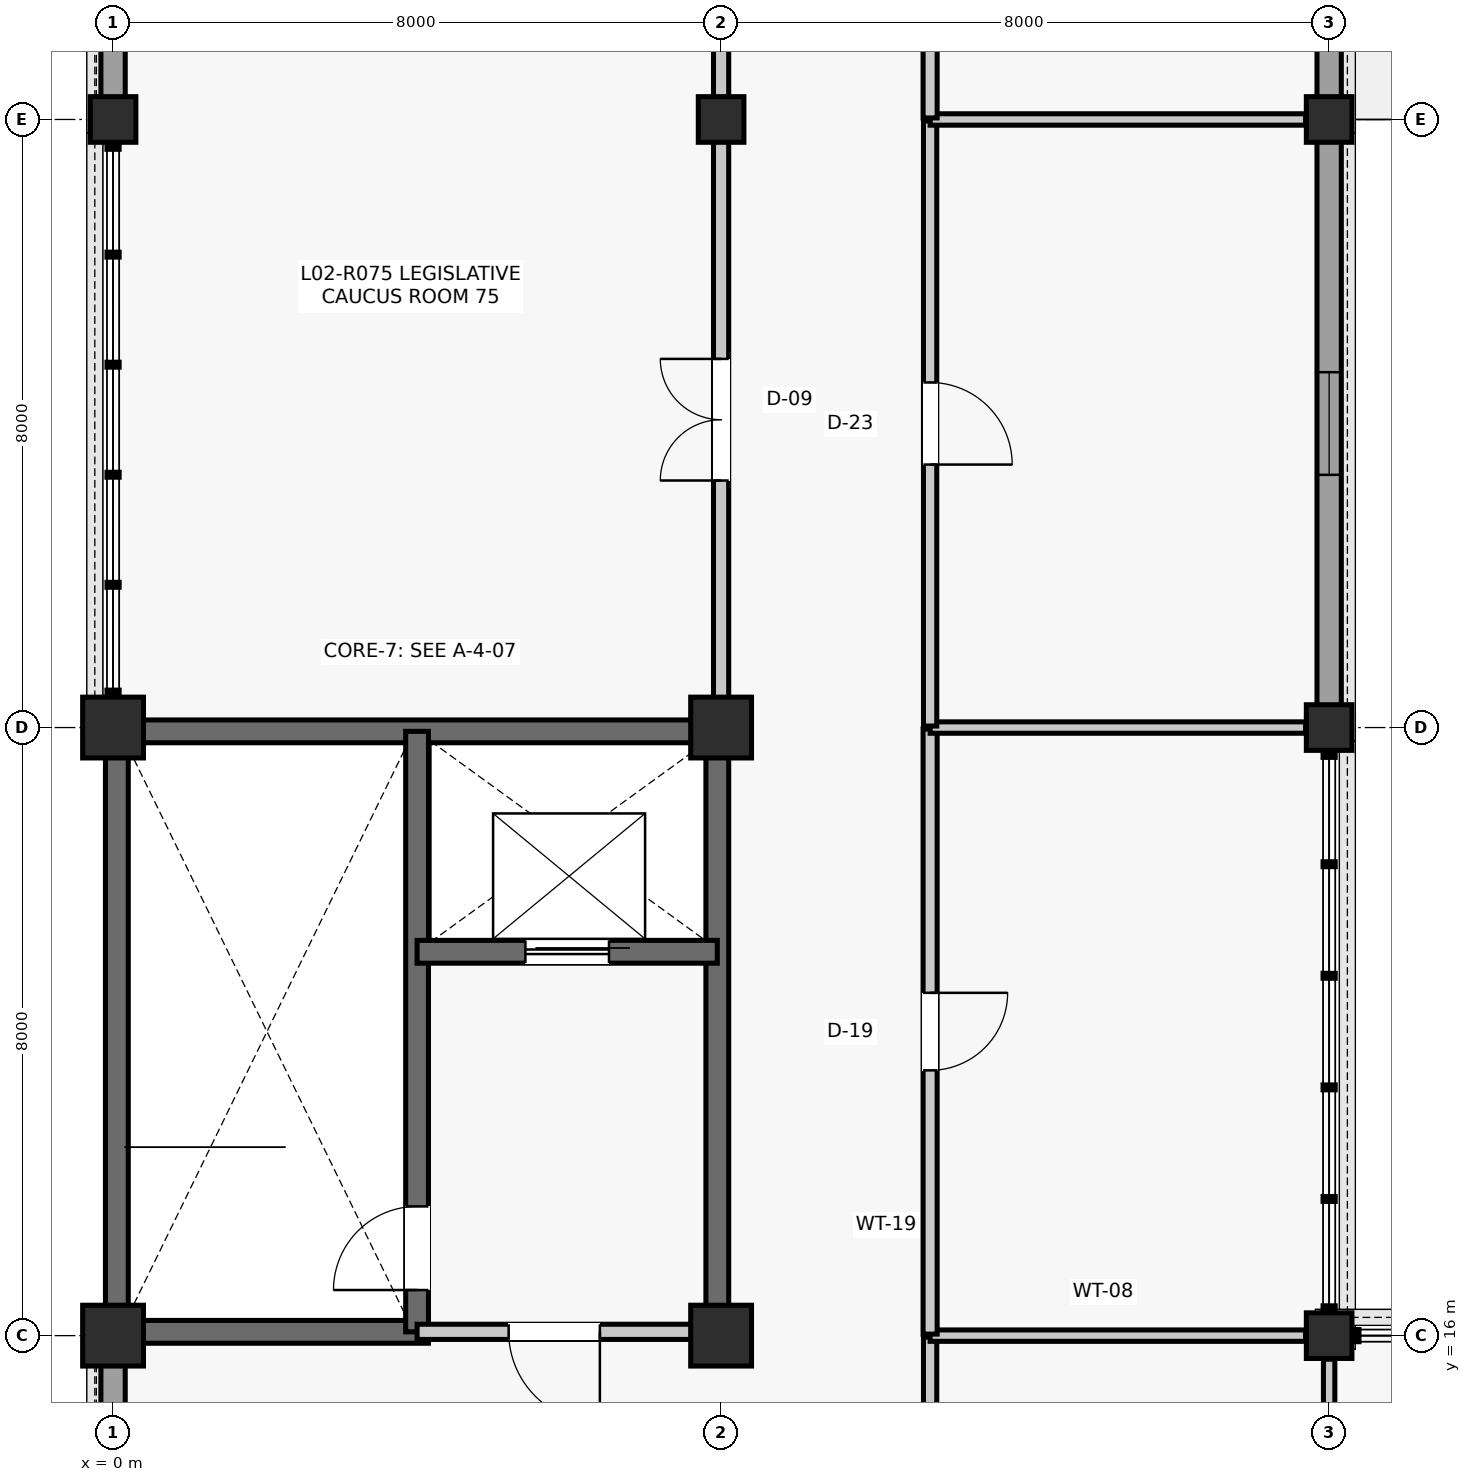
"""IFC4 building model, lengths in metres.
Left out: names, types, materials, properties, quantities, classifications, styles, units other than length and angle.
Written with IfcOpenShell. Run it as: python <this file> out.ifc"""

import sys

from ifc_helpers import new_model, si_unit, direction, frame, frame_2d, origin, origin_2d, place, context, subcontext, project, spatial, rectangle, extrude, element, fill, save


model = new_model("IFC4")
c1 = context("Model", 3, precision=1e-05, world=origin(), true_north=direction((0.0, 1.0)))
c2 = subcontext(c1, "Body", "Model", "MODEL_VIEW")
j1 = project(units=[si_unit("LENGTHUNIT", "METRE"), si_unit("PLANEANGLEUNIT", "RADIAN")], contexts=[c1])
p1 = place(None, origin())
s1 = spatial("IfcSite", under=j1, at=p1, CompositionType="ELEMENT")
p2 = place(p1, origin())
s2 = spatial("IfcBuilding", under=s1, at=p2, CompositionType="ELEMENT")
p3 = place(p2, frame((0.0, 0.0, 9.9)))
s3 = spatial("IfcBuildingStorey", under=s2, at=p3, CompositionType="ELEMENT", Elevation=9.9)
for number, where, z_axis, x_axis in (
    (1, (0.0, 16.0, 0.0), (0.0, 0.0, 1.0), (1.0, 0.0, 0.0)),
    (2, (0.0, 24.0, 0.0), (0.0, 0.0, 1.0), (1.0, 0.0, 0.0)),
):
    element("IfcColumn", number, at=place(p3, frame(where, z_axis=z_axis, x_axis=x_axis)), inside=s3, PredefinedType="COLUMN", context=c2, shape_type="SweptSolid", body=[
        extrude(rectangle(XDim=0.8, YDim=0.8, at=origin_2d()), origin(), (0.0, 0.0, 1.0), 3.96),
    ])
p4 = place(p3, frame((0.0, 32.0, 0.0), z_axis=(0.0, 0.0, 1.0), x_axis=(1.0, 0.0, 0.0)))
e3 = element("IfcColumn", 3, at=p4, inside=s3, PredefinedType="COLUMN", context=c2, shape_type="SweptSolid", body=[
    extrude(rectangle(XDim=0.6, YDim=0.6, at=origin_2d()), origin(), (0.0, 0.0, 1.0), 3.96),
])
for number, where, z_axis, x_axis in (
    (4, (8.0, 16.0, 0.0), (0.0, 0.0, 1.0), (1.0, 0.0, 0.0)),
    (5, (8.0, 24.0, 0.0), (0.0, 0.0, 1.0), (1.0, 0.0, 0.0)),
):
    element("IfcColumn", number, at=place(p3, frame(where, z_axis=z_axis, x_axis=x_axis)), inside=s3, PredefinedType="COLUMN", context=c2, shape_type="SweptSolid", body=[
        extrude(rectangle(XDim=0.8, YDim=0.8, at=origin_2d()), origin(), (0.0, 0.0, 1.0), 3.96),
    ])
for number, where, z_axis, x_axis in (
    (6, (8.0, 32.0, 0.0), (0.0, 0.0, 1.0), (1.0, 0.0, 0.0)),
    (7, (16.0, 16.0, 0.0), (0.0, 0.0, 1.0), (1.0, 0.0, 0.0)),
    (8, (16.0, 24.0, 0.0), (0.0, 0.0, 1.0), (1.0, 0.0, 0.0)),
    (9, (16.0, 32.0, 0.0), (0.0, 0.0, 1.0), (1.0, 0.0, 0.0)),
):
    element("IfcColumn", number, at=place(p3, frame(where, z_axis=z_axis, x_axis=x_axis)), inside=s3, PredefinedType="COLUMN", context=c2, shape_type="SweptSolid", body=[
        extrude(rectangle(XDim=0.6, YDim=0.6, at=origin_2d()), origin(), (0.0, 0.0, 1.0), 3.96),
    ])
p5 = place(p3, frame((0.0, 8.285, 0.0), z_axis=(0.0, 0.0, 1.0), x_axis=(0.0, 1.0, 0.0)))
e10 = element("IfcWall", 10, at=p5, inside=s3, PredefinedType="SOLIDWALL", context=c2, shape_type="SweptSolid", body=[
    extrude(rectangle(XDim=7.33, YDim=0.32, at=frame_2d((3.665, 0.0))), origin(), (0.0, 0.0, 1.0), 3.362),
])
p6 = place(p5, frame((2.765, 0.0, 1.35)))
e11 = element("IfcOpeningElement", 11, at=p6, cuts=e10, PredefinedType="OPENING", context=c2, shape_type="SweptSolid", body=[
    extrude(rectangle(XDim=1.8, YDim=1.2, at=frame_2d((0.9, 0.6))), frame((0.0, 0.17, 0.0), z_axis=(0.0, -1.0, 0.0), x_axis=(1.0, 0.0, 0.0)), (0.0, 0.0, 1.0), 0.34),
])
p7 = place(p3, frame((0.0, 32.285, 0.0), z_axis=(0.0, 0.0, 1.0), x_axis=(0.0, 1.0, 0.0)))
e12 = element("IfcWall", 12, at=p7, inside=s3, PredefinedType="SOLIDWALL", context=c2, shape_type="SweptSolid", body=[
    extrude(rectangle(XDim=7.43, YDim=0.32, at=frame_2d((3.715, 0.0))), origin(), (0.0, 0.0, 1.0), 3.299),
])
p8 = place(p7, frame((3.04, 0.0, 0.9)))
e13 = element("IfcOpeningElement", 13, at=p8, cuts=e12, PredefinedType="OPENING", context=c2, shape_type="SweptSolid", body=[
    extrude(rectangle(XDim=1.35, YDim=1.9, at=frame_2d((0.675, 0.95))), frame((0.0, 0.17, 0.0), z_axis=(0.0, -1.0, 0.0), x_axis=(1.0, 0.0, 0.0)), (0.0, 0.0, 1.0), 0.34),
])
p9 = place(p3, frame((16.0, 24.285, 0.0), z_axis=(0.0, 0.0, 1.0), x_axis=(0.0, 1.0, 0.0)))
e14 = element("IfcWall", 14, at=p9, inside=s3, PredefinedType="SOLIDWALL", context=c2, shape_type="SweptSolid", body=[
    extrude(rectangle(XDim=7.43, YDim=0.32, at=frame_2d((3.715, 0.0))), origin(), (0.0, 0.0, 1.0), 3.249),
])
p10 = place(p9, frame((3.04, 0.0, 0.9)))
e15 = element("IfcOpeningElement", 15, at=p10, cuts=e14, PredefinedType="OPENING", context=c2, shape_type="SweptSolid", body=[
    extrude(rectangle(XDim=1.35, YDim=1.9, at=frame_2d((0.675, 0.95))), frame((0.0, 0.17, 0.0), z_axis=(0.0, -1.0, 0.0), x_axis=(1.0, 0.0, 0.0)), (0.0, 0.0, 1.0), 0.34),
])
p11 = place(p3, frame((16.0, 32.285, 0.0), z_axis=(0.0, 0.0, 1.0), x_axis=(0.0, 1.0, 0.0)))
e16 = element("IfcWall", 16, at=p11, inside=s3, PredefinedType="SOLIDWALL", context=c2, shape_type="SweptSolid", body=[
    extrude(rectangle(XDim=7.43, YDim=0.32, at=frame_2d((3.715, 0.0))), origin(), (0.0, 0.0, 1.0), 3.295),
])
p12 = place(p11, frame((3.115, 0.0, 0.9)))
e17 = element("IfcOpeningElement", 17, at=p12, cuts=e16, PredefinedType="OPENING", context=c2, shape_type="SweptSolid", body=[
    extrude(rectangle(XDim=1.2, YDim=1.8, at=frame_2d((0.6, 0.9))), frame((0.0, 0.17, 0.0), z_axis=(0.0, -1.0, 0.0), x_axis=(1.0, 0.0, 0.0)), (0.0, 0.0, 1.0), 0.34),
])
for number, where, z_axis, x_axis in (
    (18, (0.05, 16.29, 0.0), (0.0, 0.0, 1.0), (0.0, 1.0, 0.0)),
    (19, (0.29, 23.95, 0.0), (0.0, 0.0, 1.0), (1.0, 0.0, 0.0)),
    (20, (7.95, 16.29, 0.0), (0.0, 0.0, 1.0), (0.0, 1.0, 0.0)),
):
    element("IfcWall", number, at=place(p3, frame(where, z_axis=z_axis, x_axis=x_axis)), inside=s3, PredefinedType="SHEAR", context=c2, shape_type="SweptSolid", body=[
        extrude(rectangle(XDim=7.42, YDim=0.3, at=frame_2d((3.71, 0.0))), origin(), (0.0, 0.0, 1.0), 3.705),
    ])
p13 = place(p3, frame((0.29, 16.05, 0.0), z_axis=(0.0, 0.0, 1.0), x_axis=(1.0, 0.0, 0.0)))
e21 = element("IfcWall", 21, at=p13, inside=s3, PredefinedType="SHEAR", context=c2, shape_type="SweptSolid", body=[
    extrude(rectangle(XDim=3.86, YDim=0.3, at=frame_2d((1.93, 0.0))), origin(), (0.0, 0.0, 1.0), 3.705),
])
p14 = place(p3, frame((4.0, 16.05, 0.0), z_axis=(0.0, 0.0, 1.0), x_axis=(0.0, 1.0, 0.0)))
e22 = element("IfcWall", 22, at=p14, inside=s3, PredefinedType="SHEAR", context=c2, shape_type="SweptSolid", body=[
    extrude(rectangle(XDim=7.9, YDim=0.3, at=frame_2d((3.95, 0.0))), origin(), (0.0, 0.0, 1.0), 3.705),
])
p15 = place(p14, frame((0.55, 0.0, 0.0)))
e23 = element("IfcOpeningElement", 23, at=p15, cuts=e22, PredefinedType="OPENING", context=c2, shape_type="SweptSolid", body=[
    extrude(rectangle(XDim=1.1, YDim=2.15, at=frame_2d((0.55, 1.075))), frame((0.0, 0.16, 0.0), z_axis=(0.0, -1.0, 0.0), x_axis=(1.0, 0.0, 0.0)), (0.0, 0.0, 1.0), 0.32),
])
p16 = place(p3, frame((4.0, 21.05, 0.0), z_axis=(0.0, 0.0, 1.0), x_axis=(1.0, 0.0, 0.0)))
e24 = element("IfcWall", 24, at=p16, inside=s3, PredefinedType="SHEAR", context=c2, shape_type="SweptSolid", body=[
    extrude(rectangle(XDim=3.95, YDim=0.3, at=frame_2d((1.975, 0.0))), origin(), (0.0, 0.0, 1.0), 3.705),
])
p17 = place(p16, frame((1.425, 0.0, 0.0)))
e25 = element("IfcOpeningElement", 25, at=p17, cuts=e24, PredefinedType="OPENING", context=c2, shape_type="SweptSolid", body=[
    extrude(rectangle(XDim=1.1, YDim=2.2, at=frame_2d((0.55, 1.1))), frame((0.0, 0.16, 0.0), z_axis=(0.0, -1.0, 0.0), x_axis=(1.0, 0.0, 0.0)), (0.0, 0.0, 1.0), 0.32),
])
p18 = place(p3, frame((4.0, 16.05, 0.0), z_axis=(0.0, 0.0, 1.0), x_axis=(1.0, 0.0, 0.0)))
e26 = element("IfcWall", 26, at=p18, inside=s3, PredefinedType="PARTITIONING", context=c2, shape_type="SweptSolid", body=[
    extrude(rectangle(XDim=3.61, YDim=0.2, at=frame_2d((1.805, 0.0))), origin(), (0.0, 0.0, 1.0), 3.156),
])
p19 = place(p18, frame((1.205, 0.0, 0.0)))
e27 = element("IfcOpeningElement", 27, at=p19, cuts=e26, PredefinedType="OPENING", context=c2, shape_type="SweptSolid", body=[
    extrude(rectangle(XDim=1.2, YDim=2.15, at=frame_2d((0.6, 1.075))), frame((0.0, 0.11, 0.0), z_axis=(0.0, -1.0, 0.0), x_axis=(1.0, 0.0, 0.0)), (0.0, 0.0, 1.0), 0.22),
])
p20 = place(p3, frame((10.75, 10.7, 0.0), z_axis=(0.0, 0.0, 1.0), x_axis=(0.0, 1.0, 0.0)))
e28 = element("IfcWall", 28, at=p20, inside=s3, PredefinedType="PARTITIONING", context=c2, shape_type="SweptSolid", body=[
    extrude(rectangle(XDim=5.28, YDim=0.175, at=frame_2d((2.64, 0.0))), origin(), (0.0, 0.0, 1.0), 3.166),
])
p21 = place(p3, frame((10.75, 16.0, 0.0), z_axis=(0.0, 0.0, 1.0), x_axis=(1.0, 0.0, 0.0)))
e29 = element("IfcWall", 29, at=p21, inside=s3, PredefinedType="PARTITIONING", context=c2, shape_type="SweptSolid", body=[
    extrude(rectangle(XDim=4.94, YDim=0.15, at=frame_2d((2.47, 0.0))), origin(), (0.0, 0.0, 1.0), 3.166),
])
p22 = place(p3, frame((16.0, 10.75, 0.0), z_axis=(0.0, 0.0, 1.0), x_axis=(0.0, 1.0, 0.0)))
e30 = element("IfcWall", 30, at=p22, inside=s3, PredefinedType="PARTITIONING", context=c2, shape_type="SweptSolid", body=[
    extrude(rectangle(XDim=4.94, YDim=0.15, at=frame_2d((2.47, 0.0))), origin(), (0.0, 0.0, 1.0), 3.236),
])
p23 = place(p3, frame((10.75, 16.02, 0.0), z_axis=(0.0, 0.0, 1.0), x_axis=(0.0, 1.0, 0.0)))
e31 = element("IfcWall", 31, at=p23, inside=s3, PredefinedType="PARTITIONING", context=c2, shape_type="SweptSolid", body=[
    extrude(rectangle(XDim=7.96, YDim=0.185, at=frame_2d((3.98, 0.0))), origin(), (0.0, 0.0, 1.0), 3.097),
])
p24 = place(p23, frame((3.47, 0.0, 0.0)))
e32 = element("IfcOpeningElement", 32, at=p24, cuts=e31, PredefinedType="OPENING", context=c2, shape_type="SweptSolid", body=[
    extrude(rectangle(XDim=1.02, YDim=2.2, at=frame_2d((0.51, 1.1))), frame((0.0, 0.103, 0.0), z_axis=(0.0, -1.0, 0.0), x_axis=(1.0, 0.0, 0.0)), (0.0, 0.0, 1.0), 0.205),
])
p25 = place(p3, frame((10.75, 24.0, 0.0), z_axis=(0.0, 0.0, 1.0), x_axis=(1.0, 0.0, 0.0)))
e33 = element("IfcWall", 33, at=p25, inside=s3, PredefinedType="PARTITIONING", context=c2, shape_type="SweptSolid", body=[
    extrude(rectangle(XDim=4.94, YDim=0.15, at=frame_2d((2.47, 0.0))), origin(), (0.0, 0.0, 1.0), 3.097),
])
p26 = place(p3, frame((10.75, 24.02, 0.0), z_axis=(0.0, 0.0, 1.0), x_axis=(0.0, 1.0, 0.0)))
e34 = element("IfcWall", 34, at=p26, inside=s3, PredefinedType="PARTITIONING", context=c2, shape_type="SweptSolid", body=[
    extrude(rectangle(XDim=7.96, YDim=0.175, at=frame_2d((3.98, 0.0))), origin(), (0.0, 0.0, 1.0), 3.097),
])
p27 = place(p26, frame((3.44, 0.0, 0.0)))
e35 = element("IfcOpeningElement", 35, at=p27, cuts=e34, PredefinedType="OPENING", context=c2, shape_type="SweptSolid", body=[
    extrude(rectangle(XDim=1.08, YDim=2.2, at=frame_2d((0.54, 1.1))), frame((0.0, 0.097, 0.0), z_axis=(0.0, -1.0, 0.0), x_axis=(1.0, 0.0, 0.0)), (0.0, 0.0, 1.0), 0.195),
])
p28 = place(p3, frame((10.75, 32.0, 0.0), z_axis=(0.0, 0.0, 1.0), x_axis=(1.0, 0.0, 0.0)))
e36 = element("IfcWall", 36, at=p28, inside=s3, PredefinedType="PARTITIONING", context=c2, shape_type="SweptSolid", body=[
    extrude(rectangle(XDim=4.94, YDim=0.15, at=frame_2d((2.47, 0.0))), origin(), (0.0, 0.0, 1.0), 3.172),
])
p29 = place(p3, frame((10.75, 32.02, 0.0), z_axis=(0.0, 0.0, 1.0), x_axis=(0.0, 1.0, 0.0)))
e37 = element("IfcWall", 37, at=p29, inside=s3, PredefinedType="PARTITIONING", context=c2, shape_type="SweptSolid", body=[
    extrude(rectangle(XDim=7.96, YDim=0.185, at=frame_2d((3.98, 0.0))), origin(), (0.0, 0.0, 1.0), 3.141),
])
p30 = place(p29, frame((3.46, 0.0, 0.0)))
e38 = element("IfcOpeningElement", 38, at=p30, cuts=e37, PredefinedType="OPENING", context=c2, shape_type="SweptSolid", body=[
    extrude(rectangle(XDim=1.04, YDim=2.18, at=frame_2d((0.52, 1.09))), frame((0.0, 0.103, 0.0), z_axis=(0.0, -1.0, 0.0), x_axis=(1.0, 0.0, 0.0)), (0.0, 0.0, 1.0), 0.205),
])
p31 = place(p3, frame((8.0, 24.39, 0.0), z_axis=(0.0, 0.0, 1.0), x_axis=(0.0, 1.0, 0.0)))
e39 = element("IfcWall", 39, at=p31, inside=s3, PredefinedType="PARTITIONING", context=c2, shape_type="SweptSolid", body=[
    extrude(rectangle(XDim=7.32, YDim=0.2, at=frame_2d((3.66, 0.0))), origin(), (0.0, 0.0, 1.0), 3.172),
])
p32 = place(p31, frame((2.86, 0.0, 0.0)))
e40 = element("IfcOpeningElement", 40, at=p32, cuts=e39, PredefinedType="OPENING", context=c2, shape_type="SweptSolid", body=[
    extrude(rectangle(XDim=1.6, YDim=2.25, at=frame_2d((0.8, 1.125))), frame((0.0, 0.11, 0.0), z_axis=(0.0, -1.0, 0.0), x_axis=(1.0, 0.0, 0.0)), (0.0, 0.0, 1.0), 0.22),
])
p33 = place(p3, frame((8.0, 32.29, 0.0), z_axis=(0.0, 0.0, 1.0), x_axis=(0.0, 1.0, 0.0)))
e41 = element("IfcWall", 41, at=p33, inside=s3, PredefinedType="PARTITIONING", context=c2, shape_type="SweptSolid", body=[
    extrude(rectangle(XDim=7.42, YDim=0.2, at=frame_2d((3.71, 0.0))), origin(), (0.0, 0.0, 1.0), 3.242),
])
p34 = place(p33, frame((2.76, 0.0, 0.0)))
e42 = element("IfcOpeningElement", 42, at=p34, cuts=e41, PredefinedType="OPENING", context=c2, shape_type="SweptSolid", body=[
    extrude(rectangle(XDim=1.9, YDim=2.38, at=frame_2d((0.95, 1.19))), frame((0.0, 0.11, 0.0), z_axis=(0.0, -1.0, 0.0), x_axis=(1.0, 0.0, 0.0)), (0.0, 0.0, 1.0), 0.22),
])
p35 = place(p10, origin())
e43 = element("IfcWindow", 43, at=p35, inside=s3, PartitioningType="SINGLE_PANEL", PredefinedType="WINDOW", context=c2, shape_type="SweptSolid", body=[
    extrude(rectangle(XDim=1.35, YDim=1.9, at=frame_2d((0.675, 0.95))), frame((0.0, 0.03, 0.0), z_axis=(0.0, -1.0, 0.0), x_axis=(1.0, 0.0, 0.0)), (0.0, 0.0, 1.0), 0.06),
])
fill(e15, e43)
p36 = place(p15, origin())
e44 = element("IfcDoor", 44, at=p36, inside=s3, OperationType="SINGLE_SWING_LEFT", PredefinedType="DOOR", context=c2, shape_type="SweptSolid", body=[
    extrude(rectangle(XDim=1.1, YDim=2.15, at=frame_2d((0.55, 1.075))), frame((0.0, 0.025, 0.0), z_axis=(0.0, -1.0, 0.0), x_axis=(1.0, 0.0, 0.0)), (0.0, 0.0, 1.0), 0.05),
])
fill(e23, e44)
p37 = place(p17, origin())
e45 = element("IfcDoor", 45, at=p37, inside=s3, OperationType="SLIDING_TO_LEFT", PredefinedType="DOOR", context=c2, shape_type="SweptSolid", body=[
    extrude(rectangle(XDim=1.1, YDim=2.2, at=frame_2d((0.55, 1.1))), frame((0.0, 0.025, 0.0), z_axis=(0.0, -1.0, 0.0), x_axis=(1.0, 0.0, 0.0)), (0.0, 0.0, 1.0), 0.05),
])
fill(e25, e45)
p38 = place(p19, frame((1.2, 0.0, 0.0), z_axis=(0.0, 0.0, 1.0), x_axis=(-1.0, 0.0, 0.0)))
e46 = element("IfcDoor", 46, at=p38, inside=s3, OperationType="SINGLE_SWING_RIGHT", PredefinedType="DOOR", context=c2, shape_type="SweptSolid", body=[
    extrude(rectangle(XDim=1.2, YDim=2.15, at=frame_2d((0.6, 1.075))), frame((0.0, 0.025, 0.0), z_axis=(0.0, -1.0, 0.0), x_axis=(1.0, 0.0, 0.0)), (0.0, 0.0, 1.0), 0.05),
])
fill(e27, e46)
p39 = place(p24, frame((1.02, 0.0, 0.0), z_axis=(0.0, 0.0, 1.0), x_axis=(-1.0, 0.0, 0.0)))
e47 = element("IfcDoor", 47, at=p39, inside=s3, OperationType="SINGLE_SWING_RIGHT", PredefinedType="DOOR", context=c2, shape_type="SweptSolid", body=[
    extrude(rectangle(XDim=1.02, YDim=2.2, at=frame_2d((0.51, 1.1))), frame((0.0, 0.025, 0.0), z_axis=(0.0, -1.0, 0.0), x_axis=(1.0, 0.0, 0.0)), (0.0, 0.0, 1.0), 0.05),
])
fill(e32, e47)
p40 = place(p27, frame((1.08, 0.0, 0.0), z_axis=(0.0, 0.0, 1.0), x_axis=(-1.0, 0.0, 0.0)))
e48 = element("IfcDoor", 48, at=p40, inside=s3, OperationType="SINGLE_SWING_LEFT", PredefinedType="DOOR", context=c2, shape_type="SweptSolid", body=[
    extrude(rectangle(XDim=1.08, YDim=2.2, at=frame_2d((0.54, 1.1))), frame((0.0, 0.025, 0.0), z_axis=(0.0, -1.0, 0.0), x_axis=(1.0, 0.0, 0.0)), (0.0, 0.0, 1.0), 0.05),
])
fill(e35, e48)
p41 = place(p32, origin())
e49 = element("IfcDoor", 49, at=p41, inside=s3, OperationType="DOUBLE_DOOR_SINGLE_SWING", PredefinedType="DOOR", context=c2, shape_type="SweptSolid", body=[
    extrude(rectangle(XDim=1.6, YDim=2.25, at=frame_2d((0.8, 1.125))), frame((0.0, 0.025, 0.0), z_axis=(0.0, -1.0, 0.0), x_axis=(1.0, 0.0, 0.0)), (0.0, 0.0, 1.0), 0.05),
])
fill(e40, e49)
save(model, sys.argv[1])
